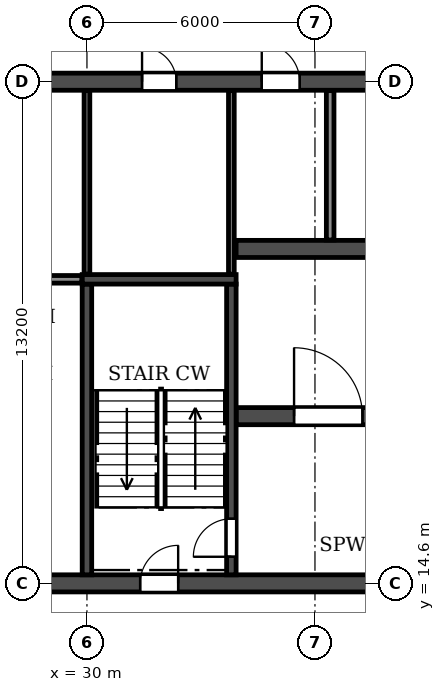
"""IFC4 building model, lengths in metres.
Left out: names, types, materials, properties, quantities, classifications, styles, units other than length and angle.
Written with IfcOpenShell. Run it as: python <this file> out.ifc"""

import sys

from ifc_helpers import new_model, si_unit, direction, frame, frame_2d, origin, place, context, subcontext, project, spatial, rectangle, extrude, element, fill, save


model = new_model("IFC4")
c1 = context("Model", 3, precision=1e-05, world=origin(), true_north=direction((0.0, 1.0)))
c2 = subcontext(c1, "Body", "Model", "MODEL_VIEW")
j1 = project(units=[si_unit("LENGTHUNIT", "METRE"), si_unit("PLANEANGLEUNIT", "RADIAN")], contexts=[c1])
p1 = place(None, origin())
s1 = spatial("IfcSite", under=j1, at=p1, CompositionType="ELEMENT")
p2 = place(p1, origin())
s2 = spatial("IfcBuilding", under=s1, at=p2, CompositionType="ELEMENT")
p3 = place(p2, frame((0.0, 0.0, 15.0)))
s3 = spatial("IfcBuildingStorey", under=s2, at=p3, CompositionType="ELEMENT", Elevation=15.0)
p4 = place(p3, frame((18.0, 14.6, 0.0), z_axis=(0.0, 0.0, 1.0), x_axis=(1.0, 0.0, 0.0)))
e1 = element("IfcWall", 1, at=p4, inside=s3, PredefinedType="SOLIDWALL", context=c2, shape_type="SweptSolid", body=[
    extrude(rectangle(XDim=66.0, YDim=0.45, at=frame_2d((33.0, 0.0))), origin(), (0.0, 0.0, 1.0), 3.92),
])
p5 = place(p4, frame((0.9, 0.0, 0.0)))
e2 = element("IfcOpeningElement", 2, at=p5, cuts=e1, PredefinedType="OPENING", context=c2, shape_type="SweptSolid", body=[
    extrude(rectangle(XDim=1.0, YDim=2.1, at=frame_2d((0.5, 1.05))), frame((0.0, 0.235, 0.0), z_axis=(0.0, -1.0, 0.0), x_axis=(1.0, 0.0, 0.0)), (0.0, 0.0, 1.0), 0.47),
])
p6 = place(p4, frame((8.8, 0.0, 0.0)))
e3 = element("IfcOpeningElement", 3, at=p6, cuts=e1, PredefinedType="OPENING", context=c2, shape_type="SweptSolid", body=[
    extrude(rectangle(XDim=1.0, YDim=2.1, at=frame_2d((0.5, 1.05))), frame((0.0, 0.235, 0.0), z_axis=(0.0, -1.0, 0.0), x_axis=(1.0, 0.0, 0.0)), (0.0, 0.0, 1.0), 0.47),
])
p7 = place(p4, frame((13.4, 0.0, 0.0)))
e4 = element("IfcOpeningElement", 4, at=p7, cuts=e1, PredefinedType="OPENING", context=c2, shape_type="SweptSolid", body=[
    extrude(rectangle(XDim=1.0, YDim=2.1, at=frame_2d((0.5, 1.05))), frame((0.0, 0.235, 0.0), z_axis=(0.0, -1.0, 0.0), x_axis=(1.0, 0.0, 0.0)), (0.0, 0.0, 1.0), 0.47),
])
p8 = place(p4, frame((26.0, 0.0, 0.0)))
e5 = element("IfcOpeningElement", 5, at=p8, cuts=e1, PredefinedType="OPENING", context=c2, shape_type="SweptSolid", body=[
    extrude(rectangle(XDim=1.0, YDim=2.1, at=frame_2d((0.5, 1.05))), frame((0.0, 0.235, 0.0), z_axis=(0.0, -1.0, 0.0), x_axis=(1.0, 0.0, 0.0)), (0.0, 0.0, 1.0), 0.47),
])
p9 = place(p4, frame((29.9, 0.0, 0.0)))
e6 = element("IfcOpeningElement", 6, at=p9, cuts=e1, PredefinedType="OPENING", context=c2, shape_type="SweptSolid", body=[
    extrude(rectangle(XDim=1.0, YDim=2.1, at=frame_2d((0.5, 1.05))), frame((0.0, 0.235, 0.0), z_axis=(0.0, -1.0, 0.0), x_axis=(1.0, 0.0, 0.0)), (0.0, 0.0, 1.0), 0.47),
])
p10 = place(p4, frame((32.5, 0.0, 0.0)))
e7 = element("IfcOpeningElement", 7, at=p10, cuts=e1, PredefinedType="OPENING", context=c2, shape_type="SweptSolid", body=[
    extrude(rectangle(XDim=1.0, YDim=2.1, at=frame_2d((0.5, 1.05))), frame((0.0, 0.235, 0.0), z_axis=(0.0, -1.0, 0.0), x_axis=(1.0, 0.0, 0.0)), (0.0, 0.0, 1.0), 0.47),
])
p11 = place(p4, frame((35.1, 0.0, 0.0)))
e8 = element("IfcOpeningElement", 8, at=p11, cuts=e1, PredefinedType="OPENING", context=c2, shape_type="SweptSolid", body=[
    extrude(rectangle(XDim=1.0, YDim=2.1, at=frame_2d((0.5, 1.05))), frame((0.0, 0.235, 0.0), z_axis=(0.0, -1.0, 0.0), x_axis=(1.0, 0.0, 0.0)), (0.0, 0.0, 1.0), 0.47),
])
p12 = place(p4, frame((39.0, 0.0, 0.0)))
e9 = element("IfcOpeningElement", 9, at=p12, cuts=e1, PredefinedType="OPENING", context=c2, shape_type="SweptSolid", body=[
    extrude(rectangle(XDim=1.0, YDim=2.1, at=frame_2d((0.5, 1.05))), frame((0.0, 0.235, 0.0), z_axis=(0.0, -1.0, 0.0), x_axis=(1.0, 0.0, 0.0)), (0.0, 0.0, 1.0), 0.47),
])
p13 = place(p4, frame((51.6, 0.0, 0.0)))
e10 = element("IfcOpeningElement", 10, at=p13, cuts=e1, PredefinedType="OPENING", context=c2, shape_type="SweptSolid", body=[
    extrude(rectangle(XDim=1.0, YDim=2.1, at=frame_2d((0.5, 1.05))), frame((0.0, 0.235, 0.0), z_axis=(0.0, -1.0, 0.0), x_axis=(1.0, 0.0, 0.0)), (0.0, 0.0, 1.0), 0.47),
])
p14 = place(p4, frame((56.25, 0.0, 0.0)))
e11 = element("IfcOpeningElement", 11, at=p14, cuts=e1, PredefinedType="OPENING", context=c2, shape_type="SweptSolid", body=[
    extrude(rectangle(XDim=0.9, YDim=2.1, at=frame_2d((0.45, 1.05))), frame((0.0, 0.235, 0.0), z_axis=(0.0, -1.0, 0.0), x_axis=(1.0, 0.0, 0.0)), (0.0, 0.0, 1.0), 0.47),
])
p15 = place(p4, frame((64.1, 0.0, 0.0)))
e12 = element("IfcOpeningElement", 12, at=p15, cuts=e1, PredefinedType="OPENING", context=c2, shape_type="SweptSolid", body=[
    extrude(rectangle(XDim=1.0, YDim=2.1, at=frame_2d((0.5, 1.05))), frame((0.0, 0.235, 0.0), z_axis=(0.0, -1.0, 0.0), x_axis=(1.0, 0.0, 0.0)), (0.0, 0.0, 1.0), 0.47),
])
p16 = place(p3, frame((18.0, 27.8, 0.0), z_axis=(0.0, 0.0, 1.0), x_axis=(1.0, 0.0, 0.0)))
e13 = element("IfcWall", 13, at=p16, inside=s3, PredefinedType="SOLIDWALL", context=c2, shape_type="SweptSolid", body=[
    extrude(rectangle(XDim=66.0, YDim=0.45, at=frame_2d((33.0, 0.0))), origin(), (0.0, 0.0, 1.0), 3.92),
])
p17 = place(p16, frame((0.9, 0.0, 0.0)))
e14 = element("IfcOpeningElement", 14, at=p17, cuts=e13, PredefinedType="OPENING", context=c2, shape_type="SweptSolid", body=[
    extrude(rectangle(XDim=1.0, YDim=2.1, at=frame_2d((0.5, 1.05))), frame((0.0, 0.235, 0.0), z_axis=(0.0, -1.0, 0.0), x_axis=(1.0, 0.0, 0.0)), (0.0, 0.0, 1.0), 0.47),
])
p18 = place(p16, frame((4.25, 0.0, 0.0)))
e15 = element("IfcOpeningElement", 15, at=p18, cuts=e13, PredefinedType="OPENING", context=c2, shape_type="SweptSolid", body=[
    extrude(rectangle(XDim=0.9, YDim=2.1, at=frame_2d((0.45, 1.05))), frame((0.0, 0.235, 0.0), z_axis=(0.0, -1.0, 0.0), x_axis=(1.0, 0.0, 0.0)), (0.0, 0.0, 1.0), 0.47),
])
p19 = place(p16, frame((8.85, 0.0, 0.0)))
e16 = element("IfcOpeningElement", 16, at=p19, cuts=e13, PredefinedType="OPENING", context=c2, shape_type="SweptSolid", body=[
    extrude(rectangle(XDim=0.9, YDim=2.1, at=frame_2d((0.45, 1.05))), frame((0.0, 0.235, 0.0), z_axis=(0.0, -1.0, 0.0), x_axis=(1.0, 0.0, 0.0)), (0.0, 0.0, 1.0), 0.47),
])
p20 = place(p16, frame((13.45, 0.0, 0.0)))
e17 = element("IfcOpeningElement", 17, at=p20, cuts=e13, PredefinedType="OPENING", context=c2, shape_type="SweptSolid", body=[
    extrude(rectangle(XDim=0.9, YDim=2.1, at=frame_2d((0.45, 1.05))), frame((0.0, 0.235, 0.0), z_axis=(0.0, -1.0, 0.0), x_axis=(1.0, 0.0, 0.0)), (0.0, 0.0, 1.0), 0.47),
])
p21 = place(p16, frame((16.6, 0.0, 0.0)))
e18 = element("IfcOpeningElement", 18, at=p21, cuts=e13, PredefinedType="OPENING", context=c2, shape_type="SweptSolid", body=[
    extrude(rectangle(XDim=1.0, YDim=2.1, at=frame_2d((0.5, 1.05))), frame((0.0, 0.235, 0.0), z_axis=(0.0, -1.0, 0.0), x_axis=(1.0, 0.0, 0.0)), (0.0, 0.0, 1.0), 0.47),
])
p22 = place(p16, frame((21.8, 0.0, 0.0)))
e19 = element("IfcOpeningElement", 19, at=p22, cuts=e13, PredefinedType="OPENING", context=c2, shape_type="SweptSolid", body=[
    extrude(rectangle(XDim=1.0, YDim=2.1, at=frame_2d((0.5, 1.05))), frame((0.0, 0.235, 0.0), z_axis=(0.0, -1.0, 0.0), x_axis=(1.0, 0.0, 0.0)), (0.0, 0.0, 1.0), 0.47),
])
p23 = place(p16, frame((29.6, 0.0, 0.0)))
e20 = element("IfcOpeningElement", 20, at=p23, cuts=e13, PredefinedType="OPENING", context=c2, shape_type="SweptSolid", body=[
    extrude(rectangle(XDim=1.0, YDim=2.1, at=frame_2d((0.5, 1.05))), frame((0.0, 0.235, 0.0), z_axis=(0.0, -1.0, 0.0), x_axis=(1.0, 0.0, 0.0)), (0.0, 0.0, 1.0), 0.47),
])
p24 = place(p16, frame((32.5, 0.0, 0.0)))
e21 = element("IfcOpeningElement", 21, at=p24, cuts=e13, PredefinedType="OPENING", context=c2, shape_type="SweptSolid", body=[
    extrude(rectangle(XDim=1.0, YDim=2.1, at=frame_2d((0.5, 1.05))), frame((0.0, 0.235, 0.0), z_axis=(0.0, -1.0, 0.0), x_axis=(1.0, 0.0, 0.0)), (0.0, 0.0, 1.0), 0.47),
])
p25 = place(p16, frame((35.4, 0.0, 0.0)))
e22 = element("IfcOpeningElement", 22, at=p25, cuts=e13, PredefinedType="OPENING", context=c2, shape_type="SweptSolid", body=[
    extrude(rectangle(XDim=1.0, YDim=2.1, at=frame_2d((0.5, 1.05))), frame((0.0, 0.235, 0.0), z_axis=(0.0, -1.0, 0.0), x_axis=(1.0, 0.0, 0.0)), (0.0, 0.0, 1.0), 0.47),
])
p26 = place(p16, frame((39.3, 0.0, 0.0)))
e23 = element("IfcOpeningElement", 23, at=p26, cuts=e13, PredefinedType="OPENING", context=c2, shape_type="SweptSolid", body=[
    extrude(rectangle(XDim=1.0, YDim=2.1, at=frame_2d((0.5, 1.05))), frame((0.0, 0.235, 0.0), z_axis=(0.0, -1.0, 0.0), x_axis=(1.0, 0.0, 0.0)), (0.0, 0.0, 1.0), 0.47),
])
p27 = place(p16, frame((43.2, 0.0, 0.0)))
e24 = element("IfcOpeningElement", 24, at=p27, cuts=e13, PredefinedType="OPENING", context=c2, shape_type="SweptSolid", body=[
    extrude(rectangle(XDim=1.0, YDim=2.1, at=frame_2d((0.5, 1.05))), frame((0.0, 0.235, 0.0), z_axis=(0.0, -1.0, 0.0), x_axis=(1.0, 0.0, 0.0)), (0.0, 0.0, 1.0), 0.47),
])
p28 = place(p16, frame((45.8, 0.0, 0.0)))
e25 = element("IfcOpeningElement", 25, at=p28, cuts=e13, PredefinedType="OPENING", context=c2, shape_type="SweptSolid", body=[
    extrude(rectangle(XDim=1.0, YDim=2.1, at=frame_2d((0.5, 1.05))), frame((0.0, 0.235, 0.0), z_axis=(0.0, -1.0, 0.0), x_axis=(1.0, 0.0, 0.0)), (0.0, 0.0, 1.0), 0.47),
])
p29 = place(p16, frame((48.4, 0.0, 0.0)))
e26 = element("IfcOpeningElement", 26, at=p29, cuts=e13, PredefinedType="OPENING", context=c2, shape_type="SweptSolid", body=[
    extrude(rectangle(XDim=1.0, YDim=2.1, at=frame_2d((0.5, 1.05))), frame((0.0, 0.235, 0.0), z_axis=(0.0, -1.0, 0.0), x_axis=(1.0, 0.0, 0.0)), (0.0, 0.0, 1.0), 0.47),
])
p30 = place(p16, frame((51.65, 0.0, 0.0)))
e27 = element("IfcOpeningElement", 27, at=p30, cuts=e13, PredefinedType="OPENING", context=c2, shape_type="SweptSolid", body=[
    extrude(rectangle(XDim=0.9, YDim=2.1, at=frame_2d((0.45, 1.05))), frame((0.0, 0.235, 0.0), z_axis=(0.0, -1.0, 0.0), x_axis=(1.0, 0.0, 0.0)), (0.0, 0.0, 1.0), 0.47),
])
p31 = place(p16, frame((56.2, 0.0, 0.0)))
e28 = element("IfcOpeningElement", 28, at=p31, cuts=e13, PredefinedType="OPENING", context=c2, shape_type="SweptSolid", body=[
    extrude(rectangle(XDim=1.0, YDim=2.1, at=frame_2d((0.5, 1.05))), frame((0.0, 0.235, 0.0), z_axis=(0.0, -1.0, 0.0), x_axis=(1.0, 0.0, 0.0)), (0.0, 0.0, 1.0), 0.47),
])
p32 = place(p16, frame((60.85, 0.0, 0.0)))
e29 = element("IfcOpeningElement", 29, at=p32, cuts=e13, PredefinedType="OPENING", context=c2, shape_type="SweptSolid", body=[
    extrude(rectangle(XDim=0.9, YDim=2.1, at=frame_2d((0.45, 1.05))), frame((0.0, 0.235, 0.0), z_axis=(0.0, -1.0, 0.0), x_axis=(1.0, 0.0, 0.0)), (0.0, 0.0, 1.0), 0.47),
])
p33 = place(p16, frame((64.1, 0.0, 0.0)))
e30 = element("IfcOpeningElement", 30, at=p33, cuts=e13, PredefinedType="OPENING", context=c2, shape_type="SweptSolid", body=[
    extrude(rectangle(XDim=1.0, YDim=2.1, at=frame_2d((0.5, 1.05))), frame((0.0, 0.235, 0.0), z_axis=(0.0, -1.0, 0.0), x_axis=(1.0, 0.0, 0.0)), (0.0, 0.0, 1.0), 0.47),
])
p34 = place(p3, frame((33.925, 19.0, 0.0), z_axis=(0.0, 0.0, 1.0), x_axis=(1.0, 0.0, 0.0)))
e31 = element("IfcWall", 31, at=p34, inside=s3, PredefinedType="SOLIDWALL", context=c2, shape_type="SweptSolid", body=[
    extrude(rectangle(XDim=34.15, YDim=0.45, at=frame_2d((17.075, 0.0))), origin(), (0.0, 0.0, 1.0), 3.92),
])
p35 = place(p34, frame((16.175, 0.0, 0.0)))
e32 = element("IfcOpeningElement", 32, at=p35, cuts=e31, PredefinedType="OPENING", context=c2, shape_type="SweptSolid", body=[
    extrude(rectangle(XDim=1.8, YDim=2.1, at=frame_2d((0.9, 1.05))), frame((0.0, 0.235, 0.0), z_axis=(0.0, -1.0, 0.0), x_axis=(1.0, 0.0, 0.0)), (0.0, 0.0, 1.0), 0.47),
])
p36 = place(p34, frame((1.525, 0.0, 0.0)))
e33 = element("IfcOpeningElement", 33, at=p36, cuts=e31, PredefinedType="OPENING", context=c2, shape_type="SweptSolid", body=[
    extrude(rectangle(XDim=1.8, YDim=2.1, at=frame_2d((0.9, 1.05))), frame((0.0, 0.235, 0.0), z_axis=(0.0, -1.0, 0.0), x_axis=(1.0, 0.0, 0.0)), (0.0, 0.0, 1.0), 0.47),
])
p37 = place(p34, frame((8.725, 0.0, 0.0)))
e34 = element("IfcOpeningElement", 34, at=p37, cuts=e31, PredefinedType="OPENING", context=c2, shape_type="SweptSolid", body=[
    extrude(rectangle(XDim=1.1, YDim=2.1, at=frame_2d((0.55, 1.05))), frame((0.0, 0.235, 0.0), z_axis=(0.0, -1.0, 0.0), x_axis=(1.0, 0.0, 0.0)), (0.0, 0.0, 1.0), 0.47),
])
p38 = place(p34, frame((11.325, 0.0, 0.0)))
e35 = element("IfcOpeningElement", 35, at=p38, cuts=e31, PredefinedType="OPENING", context=c2, shape_type="SweptSolid", body=[
    extrude(rectangle(XDim=1.1, YDim=2.1, at=frame_2d((0.55, 1.05))), frame((0.0, 0.235, 0.0), z_axis=(0.0, -1.0, 0.0), x_axis=(1.0, 0.0, 0.0)), (0.0, 0.0, 1.0), 0.47),
])
p39 = place(p34, frame((13.925, 0.0, 0.0)))
e36 = element("IfcOpeningElement", 36, at=p39, cuts=e31, PredefinedType="OPENING", context=c2, shape_type="SweptSolid", body=[
    extrude(rectangle(XDim=1.1, YDim=2.1, at=frame_2d((0.55, 1.05))), frame((0.0, 0.235, 0.0), z_axis=(0.0, -1.0, 0.0), x_axis=(1.0, 0.0, 0.0)), (0.0, 0.0, 1.0), 0.47),
])
p40 = place(p34, frame((19.125, 0.0, 0.0)))
e37 = element("IfcOpeningElement", 37, at=p40, cuts=e31, PredefinedType="OPENING", context=c2, shape_type="SweptSolid", body=[
    extrude(rectangle(XDim=1.1, YDim=2.1, at=frame_2d((0.55, 1.05))), frame((0.0, 0.235, 0.0), z_axis=(0.0, -1.0, 0.0), x_axis=(1.0, 0.0, 0.0)), (0.0, 0.0, 1.0), 0.47),
])
p41 = place(p34, frame((21.725, 0.0, 0.0)))
e38 = element("IfcOpeningElement", 38, at=p41, cuts=e31, PredefinedType="OPENING", context=c2, shape_type="SweptSolid", body=[
    extrude(rectangle(XDim=1.1, YDim=2.1, at=frame_2d((0.55, 1.05))), frame((0.0, 0.235, 0.0), z_axis=(0.0, -1.0, 0.0), x_axis=(1.0, 0.0, 0.0)), (0.0, 0.0, 1.0), 0.47),
])
p42 = place(p34, frame((24.325, 0.0, 0.0)))
e39 = element("IfcOpeningElement", 39, at=p42, cuts=e31, PredefinedType="OPENING", context=c2, shape_type="SweptSolid", body=[
    extrude(rectangle(XDim=1.1, YDim=2.1, at=frame_2d((0.55, 1.05))), frame((0.0, 0.235, 0.0), z_axis=(0.0, -1.0, 0.0), x_axis=(1.0, 0.0, 0.0)), (0.0, 0.0, 1.0), 0.47),
])
p43 = place(p34, frame((30.825, 0.0, 0.0)))
e40 = element("IfcOpeningElement", 40, at=p43, cuts=e31, PredefinedType="OPENING", context=c2, shape_type="SweptSolid", body=[
    extrude(rectangle(XDim=1.8, YDim=2.1, at=frame_2d((0.9, 1.05))), frame((0.0, 0.235, 0.0), z_axis=(0.0, -1.0, 0.0), x_axis=(1.0, 0.0, 0.0)), (0.0, 0.0, 1.0), 0.47),
])
p44 = place(p3, frame((33.925, 23.4, 0.0), z_axis=(0.0, 0.0, 1.0), x_axis=(1.0, 0.0, 0.0)))
e41 = element("IfcWall", 41, at=p44, inside=s3, PredefinedType="SOLIDWALL", context=c2, shape_type="SweptSolid", body=[
    extrude(rectangle(XDim=34.15, YDim=0.45, at=frame_2d((17.075, 0.0))), origin(), (0.0, 0.0, 1.0), 3.92),
])
p45 = place(p44, frame((16.175, 0.0, 0.0)))
e42 = element("IfcOpeningElement", 42, at=p45, cuts=e41, PredefinedType="OPENING", context=c2, shape_type="SweptSolid", body=[
    extrude(rectangle(XDim=1.8, YDim=2.1, at=frame_2d((0.9, 1.05))), frame((0.0, 0.235, 0.0), z_axis=(0.0, -1.0, 0.0), x_axis=(1.0, 0.0, 0.0)), (0.0, 0.0, 1.0), 0.47),
])
p46 = place(p44, frame((11.025, 0.0, 0.0)))
e43 = element("IfcOpeningElement", 43, at=p46, cuts=e41, PredefinedType="OPENING", context=c2, shape_type="SweptSolid", body=[
    extrude(rectangle(XDim=1.1, YDim=2.1, at=frame_2d((0.55, 1.05))), frame((0.0, 0.235, 0.0), z_axis=(0.0, -1.0, 0.0), x_axis=(1.0, 0.0, 0.0)), (0.0, 0.0, 1.0), 0.47),
])
p47 = place(p44, frame((29.825, 0.0, 0.0)))
e44 = element("IfcOpeningElement", 44, at=p47, cuts=e41, PredefinedType="OPENING", context=c2, shape_type="SweptSolid", body=[
    extrude(rectangle(XDim=1.1, YDim=2.1, at=frame_2d((0.55, 1.05))), frame((0.0, 0.235, 0.0), z_axis=(0.0, -1.0, 0.0), x_axis=(1.0, 0.0, 0.0)), (0.0, 0.0, 1.0), 0.47),
])
p48 = place(p44, frame((32.425, 0.0, 0.0)))
e45 = element("IfcOpeningElement", 45, at=p48, cuts=e41, PredefinedType="OPENING", context=c2, shape_type="SweptSolid", body=[
    extrude(rectangle(XDim=1.1, YDim=2.1, at=frame_2d((0.55, 1.05))), frame((0.0, 0.235, 0.0), z_axis=(0.0, -1.0, 0.0), x_axis=(1.0, 0.0, 0.0)), (0.0, 0.0, 1.0), 0.47),
])
p49 = place(p3, frame((30.0, 14.825, 0.0), z_axis=(0.0, 0.0, 1.0), x_axis=(0.0, 1.0, 0.0)))
e46 = element("IfcWall", 46, at=p49, inside=s3, PredefinedType="SOLIDWALL", context=c2, shape_type="SweptSolid", body=[
    extrude(rectangle(XDim=7.65, YDim=0.25, at=frame_2d((3.825, 0.0))), origin(), (0.0, 0.0, 1.0), 3.92),
])
p50 = place(p3, frame((33.8, 14.825, 0.0), z_axis=(0.0, 0.0, 1.0), x_axis=(0.0, 1.0, 0.0)))
e47 = element("IfcWall", 47, at=p50, inside=s3, PredefinedType="SOLIDWALL", context=c2, shape_type="SweptSolid", body=[
    extrude(rectangle(XDim=7.65, YDim=0.25, at=frame_2d((3.825, 0.0))), origin(), (0.0, 0.0, 1.0), 3.92),
])
p51 = place(p50, frame((0.475, 0.0, 0.0)))
e48 = element("IfcOpeningElement", 48, at=p51, cuts=e47, PredefinedType="OPENING", context=c2, shape_type="SweptSolid", body=[
    extrude(rectangle(XDim=1.0, YDim=2.1, at=frame_2d((0.5, 1.05))), frame((0.0, 0.135, 0.0), z_axis=(0.0, -1.0, 0.0), x_axis=(1.0, 0.0, 0.0)), (0.0, 0.0, 1.0), 0.27),
])
p52 = place(p3, frame((29.875, 22.6, 0.0), z_axis=(0.0, 0.0, 1.0), x_axis=(1.0, 0.0, 0.0)))
e49 = element("IfcWall", 49, at=p52, inside=s3, PredefinedType="SOLIDWALL", context=c2, shape_type="SweptSolid", body=[
    extrude(rectangle(XDim=4.05, YDim=0.25, at=frame_2d((2.025, 0.0))), origin(), (0.0, 0.0, 1.0), 3.92),
])
p53 = place(p3, frame((36.4, 23.635, 0.0), z_axis=(0.0, 0.0, 1.0), x_axis=(0.0, 1.0, 0.0)))
e50 = element("IfcWall", 50, at=p53, inside=s3, PredefinedType="PARTITIONING", context=c2, shape_type="SweptSolid", body=[
    extrude(rectangle(XDim=3.93, YDim=0.2, at=frame_2d((1.965, 0.0))), origin(), (0.0, 0.0, 1.0), 3.92),
])
p54 = place(p3, frame((24.735, 22.6, 0.0), z_axis=(0.0, 0.0, 1.0), x_axis=(1.0, 0.0, 0.0)))
e51 = element("IfcWall", 51, at=p54, inside=s3, PredefinedType="PARTITIONING", context=c2, shape_type="SweptSolid", body=[
    extrude(rectangle(XDim=5.13, YDim=0.2, at=frame_2d((2.565, 0.0))), origin(), (0.0, 0.0, 1.0), 3.92),
])
for number, where, z_axis, x_axis in (
    (52, (30.0, 22.735, 0.0), (0.0, 0.0, 1.0), (0.0, 1.0, 0.0)),
    (53, (33.8, 22.735, 0.0), (0.0, 0.0, 1.0), (0.0, 1.0, 0.0)),
):
    element("IfcWall", number, at=place(p3, frame(where, z_axis=z_axis, x_axis=x_axis)), inside=s3, PredefinedType="PARTITIONING", context=c2, shape_type="SweptSolid", body=[
        extrude(rectangle(XDim=4.83, YDim=0.15, at=frame_2d((2.415, 0.0))), origin(), (0.0, 0.0, 1.0), 3.92),
    ])
p55 = place(p20, origin())
e54 = element("IfcDoor", 54, at=p55, inside=s3, OperationType="SINGLE_SWING_LEFT", PredefinedType="DOOR", context=c2, shape_type="SweptSolid", body=[
    extrude(rectangle(XDim=0.9, YDim=2.1, at=frame_2d((0.45, 1.05))), frame((0.0, 0.025, 0.0), z_axis=(0.0, -1.0, 0.0), x_axis=(1.0, 0.0, 0.0)), (0.0, 0.0, 1.0), 0.05),
])
fill(e17, e54)
p56 = place(p21, origin())
e55 = element("IfcDoor", 55, at=p56, inside=s3, OperationType="SINGLE_SWING_LEFT", PredefinedType="DOOR", context=c2, shape_type="SweptSolid", body=[
    extrude(rectangle(XDim=1.0, YDim=2.1, at=frame_2d((0.5, 1.05))), frame((0.0, 0.025, 0.0), z_axis=(0.0, -1.0, 0.0), x_axis=(1.0, 0.0, 0.0)), (0.0, 0.0, 1.0), 0.05),
])
fill(e18, e55)
p57 = place(p7, origin())
e56 = element("IfcDoor", 56, at=p57, inside=s3, OperationType="SINGLE_SWING_RIGHT", PredefinedType="DOOR", context=c2, shape_type="SweptSolid", body=[
    extrude(rectangle(XDim=1.0, YDim=2.1, at=frame_2d((0.5, 1.05))), frame((0.0, 0.025, 0.0), z_axis=(0.0, -1.0, 0.0), x_axis=(1.0, 0.0, 0.0)), (0.0, 0.0, 1.0), 0.05),
])
fill(e4, e56)
p58 = place(p51, origin())
e57 = element("IfcDoor", 57, at=p58, inside=s3, OperationType="SINGLE_SWING_LEFT", PredefinedType="DOOR", context=c2, shape_type="SweptSolid", body=[
    extrude(rectangle(XDim=1.0, YDim=2.1, at=frame_2d((0.5, 1.05))), frame((0.0, 0.025, 0.0), z_axis=(0.0, -1.0, 0.0), x_axis=(1.0, 0.0, 0.0)), (0.0, 0.0, 1.0), 0.05),
])
fill(e48, e57)
p59 = place(p36, origin())
e58 = element("IfcDoor", 58, at=p59, inside=s3, OperationType="DOUBLE_DOOR_SINGLE_SWING", PredefinedType="DOOR", context=c2, shape_type="SweptSolid", body=[
    extrude(rectangle(XDim=1.8, YDim=2.1, at=frame_2d((0.9, 1.05))), frame((0.0, 0.025, 0.0), z_axis=(0.0, -1.0, 0.0), x_axis=(1.0, 0.0, 0.0)), (0.0, 0.0, 1.0), 0.05),
])
fill(e33, e58)
save(model, sys.argv[1])
